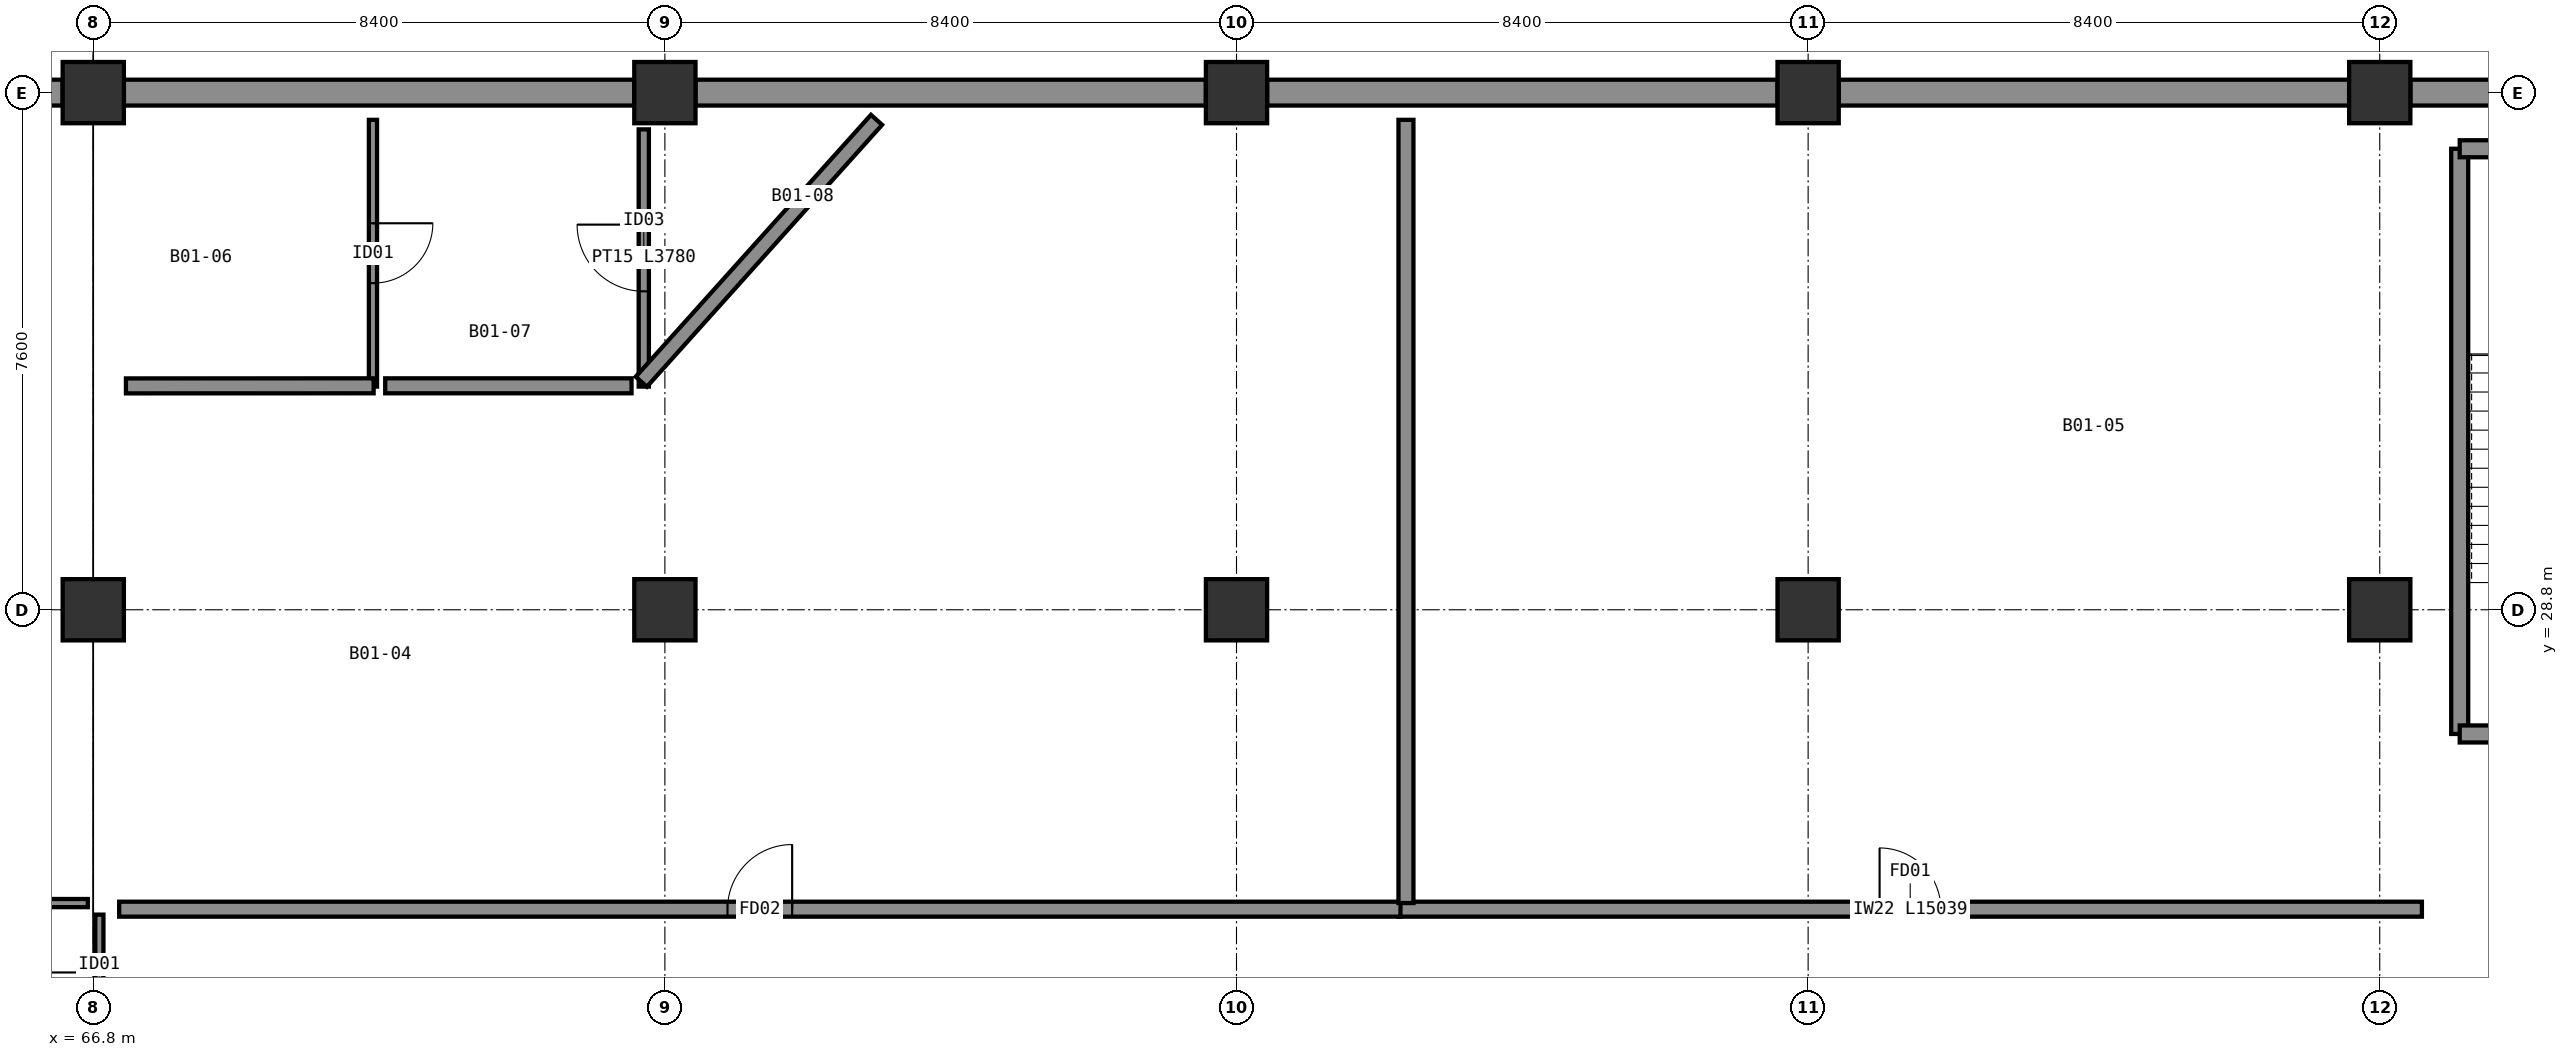
"""IFC4 building model, lengths in metres.
Left out: names, types, materials, properties, quantities, classifications, styles, units other than length and angle.
Written with IfcOpenShell. Run it as: python <this file> out.ifc"""

import sys

from ifc_helpers import new_model, si_unit, direction, frame, frame_2d, origin, origin_2d, place, context, subcontext, project, spatial, rectangle, extrude, element, fill, save


model = new_model("IFC4")
c1 = context("Model", 3, precision=1e-05, world=origin(), true_north=direction((0.0, 1.0)))
c2 = subcontext(c1, "Body", "Model", "MODEL_VIEW")
j1 = project(units=[si_unit("LENGTHUNIT", "METRE"), si_unit("PLANEANGLEUNIT", "RADIAN")], contexts=[c1])
p1 = place(None, origin())
s1 = spatial("IfcSite", under=j1, at=p1, CompositionType="ELEMENT")
p2 = place(p1, origin())
s2 = spatial("IfcBuilding", under=s1, at=p2, CompositionType="ELEMENT")
p3 = place(p2, frame((0.0, 0.0, -4.5)))
s3 = spatial("IfcBuildingStorey", under=s2, at=p3, CompositionType="ELEMENT", Elevation=-4.5)
for number, where, z_axis, x_axis in (
    (1, (66.8, 28.8, -0.4), (0.0, 0.0, 1.0), (1.0, 0.0, 0.0)),
    (2, (75.2, 28.8, -0.4), (0.0, 0.0, 1.0), (1.0, 0.0, 0.0)),
    (3, (83.6, 28.8, -0.4), (0.0, 0.0, 1.0), (1.0, 0.0, 0.0)),
    (4, (92.0, 28.8, -0.4), (0.0, 0.0, 1.0), (1.0, 0.0, 0.0)),
    (5, (100.4, 28.8, -0.4), (0.0, 0.0, 1.0), (1.0, 0.0, 0.0)),
    (6, (66.8, 36.4, -0.4), (0.0, 0.0, 1.0), (1.0, 0.0, 0.0)),
    (7, (75.2, 36.4, -0.4), (0.0, 0.0, 1.0), (1.0, 0.0, 0.0)),
    (8, (83.6, 36.4, -0.4), (0.0, 0.0, 1.0), (1.0, 0.0, 0.0)),
    (9, (92.0, 36.4, -0.4), (0.0, 0.0, 1.0), (1.0, 0.0, 0.0)),
    (10, (100.4, 36.4, -0.4), (0.0, 0.0, 1.0), (1.0, 0.0, 0.0)),
):
    element("IfcColumn", number, at=place(p3, frame(where, z_axis=z_axis, x_axis=x_axis)), inside=s3, PredefinedType="COLUMN", context=c2, shape_type="SweptSolid", body=[
        extrude(rectangle(XDim=0.9, YDim=0.9, at=origin_2d()), origin(), (0.0, 0.0, 1.0), 4.9),
    ])
for number, where, z_axis, x_axis in (
    (11, (108.35, 36.4, 0.0), (0.0, 0.0, 1.0), (-1.0, 0.0, 0.0)),
    (12, (99.95, 36.4, 0.0), (0.0, 0.0, 1.0), (-1.0, 0.0, 0.0)),
    (13, (91.55, 36.4, 0.0), (0.0, 0.0, 1.0), (-1.0, 0.0, 0.0)),
    (14, (83.15, 36.4, 0.0), (0.0, 0.0, 1.0), (-1.0, 0.0, 0.0)),
    (15, (74.75, 36.4, 0.0), (0.0, 0.0, 1.0), (-1.0, 0.0, 0.0)),
):
    element("IfcWall", number, at=place(p3, frame(where, z_axis=z_axis, x_axis=x_axis)), inside=s3, PredefinedType="SOLIDWALL", context=c2, shape_type="SweptSolid", body=[
        extrude(rectangle(XDim=7.5, YDim=0.38, at=frame_2d((3.75, 0.0))), origin(), (0.0, 0.0, 1.0), 3.51),
    ])
p4 = place(p3, frame((66.35, 36.4, 0.0), z_axis=(0.0, 0.0, 1.0), x_axis=(-1.0, 0.0, 0.0)))
e16 = element("IfcWall", 16, at=p4, inside=s3, PredefinedType="SOLIDWALL", context=c2, shape_type="SweptSolid", body=[
    extrude(rectangle(XDim=7.575, YDim=0.38, at=frame_2d((3.788, 0.0))), origin(), (0.0, 0.0, 1.0), 3.51),
])
p5 = place(p3, frame((101.575, 26.975, 0.0), z_axis=(0.0, 0.0, 1.0), x_axis=(0.0, 1.0, 0.0)))
e17 = element("IfcWall", 17, at=p5, inside=s3, PredefinedType="SHEAR", context=c2, shape_type="SweptSolid", body=[
    extrude(rectangle(XDim=8.6, YDim=0.25, at=frame_2d((4.3, 0.0))), origin(), (0.0, 0.0, 1.0), 4.18),
])
p6 = place(p3, frame((101.575, 35.575, 0.0), z_axis=(0.0, 0.0, 1.0), x_axis=(1.0, 0.0, 0.0)))
e18 = element("IfcWall", 18, at=p6, inside=s3, PredefinedType="SHEAR", context=c2, shape_type="SweptSolid", body=[
    extrude(rectangle(XDim=4.45, YDim=0.25, at=frame_2d((2.225, 0.0))), origin(), (0.0, 0.0, 1.0), 4.18),
])
p7 = place(p3, frame((101.575, 26.975, 0.0), z_axis=(0.0, 0.0, 1.0), x_axis=(1.0, 0.0, 0.0)))
e19 = element("IfcWall", 19, at=p7, inside=s3, PredefinedType="SHEAR", context=c2, shape_type="SweptSolid", body=[
    extrude(rectangle(XDim=4.45, YDim=0.25, at=frame_2d((2.225, 0.0))), origin(), (0.0, 0.0, 1.0), 4.18),
])
p8 = place(p7, frame((1.65, 0.0, 0.0)))
e20 = element("IfcOpeningElement", 20, at=p8, cuts=e19, PredefinedType="OPENING", context=c2, shape_type="SweptSolid", body=[
    extrude(rectangle(XDim=1.1, YDim=2.1, at=frame_2d((0.55, 1.05))), frame((0.0, 0.135, 0.0), z_axis=(0.0, -1.0, 0.0), x_axis=(1.0, 0.0, 0.0)), (0.0, 0.0, 1.0), 0.27),
])
p9 = place(p3, frame((85.98, 24.4, 0.0), z_axis=(0.0, 0.0, 1.0), x_axis=(1.0, 0.0, 0.0)))
e21 = element("IfcWall", 21, at=p9, inside=s3, PredefinedType="SOLIDWALL", context=c2, shape_type="SweptSolid", body=[
    extrude(rectangle(XDim=15.039, YDim=0.22, at=frame_2d((7.52, 0.0))), origin(), (0.0, 0.0, 1.0), 4.16),
])
p10 = place(p9, frame((7.07, 0.0, 0.0)))
e22 = element("IfcOpeningElement", 22, at=p10, cuts=e21, PredefinedType="OPENING", context=c2, shape_type="SweptSolid", body=[
    extrude(rectangle(XDim=0.9, YDim=2.1, at=frame_2d((0.45, 1.05))), frame((0.0, 0.12, 0.0), z_axis=(0.0, -1.0, 0.0), x_axis=(1.0, 0.0, 0.0)), (0.0, 0.0, 1.0), 0.24),
])
p11 = place(p3, frame((67.18, 24.4, 0.0), z_axis=(0.0, 0.0, 1.0), x_axis=(1.0, 0.0, 0.0)))
e23 = element("IfcWall", 23, at=p11, inside=s3, PredefinedType="SOLIDWALL", context=c2, shape_type="SweptSolid", body=[
    extrude(rectangle(XDim=18.829, YDim=0.22, at=frame_2d((9.415, 0.0))), origin(), (0.0, 0.0, 1.0), 4.16),
])
p12 = place(p11, frame((8.939, 0.0, 0.0)))
e24 = element("IfcOpeningElement", 24, at=p12, cuts=e23, PredefinedType="OPENING", context=c2, shape_type="SweptSolid", body=[
    extrude(rectangle(XDim=0.95, YDim=2.1, at=frame_2d((0.475, 1.05))), frame((0.0, 0.12, 0.0), z_axis=(0.0, -1.0, 0.0), x_axis=(1.0, 0.0, 0.0)), (0.0, 0.0, 1.0), 0.24),
])
p13 = place(p3, frame((66.89, 21.74, 0.0), z_axis=(0.0, 0.0, 1.0), x_axis=(-0.000189250564, 0.999999982092, 0.0)))
e25 = element("IfcWall", 25, at=p13, inside=s3, PredefinedType="PARTITIONING", context=c2, shape_type="SweptSolid", body=[
    extrude(rectangle(XDim=2.58, YDim=0.12, at=frame_2d((1.29, 0.0))), origin(), (0.0, 0.0, 1.0), 3.51),
])
p14 = place(p13, frame((0.85, 0.0, 0.0)))
e26 = element("IfcOpeningElement", 26, at=p14, cuts=e25, PredefinedType="OPENING", context=c2, shape_type="SweptSolid", body=[
    extrude(rectangle(XDim=0.88, YDim=2.08, at=frame_2d((0.44, 1.04))), frame((0.0, 0.07, 0.0), z_axis=(0.0, -1.0, 0.0), x_axis=(1.0, 0.0, 0.0)), (0.0, 0.0, 1.0), 0.14),
])
p15 = place(p3, frame((66.72, 24.49, 0.0), z_axis=(0.0, 0.0, 1.0), x_axis=(-0.999999823344, 0.000594400927, 0.0)))
e27 = element("IfcWall", 27, at=p15, inside=s3, PredefinedType="PARTITIONING", context=c2, shape_type="SweptSolid", body=[
    extrude(rectangle(XDim=16.84, YDim=0.12, at=frame_2d((8.42, 0.0))), origin(), (0.0, 0.0, 1.0), 4.16),
])
p16 = place(p15, frame((7.96, 0.0, 0.0)))
e28 = element("IfcOpeningElement", 28, at=p16, cuts=e27, PredefinedType="OPENING", context=c2, shape_type="SweptSolid", body=[
    extrude(rectangle(XDim=0.92, YDim=2.08, at=frame_2d((0.46, 1.04))), frame((0.0, 0.07, 0.0), z_axis=(0.0, -1.0, 0.0), x_axis=(1.0, 0.0, 0.0)), (0.0, 0.0, 1.0), 0.14),
])
p17 = place(p3, frame((74.89, 32.08, 0.0), z_axis=(0.0, 0.0, 1.0), x_axis=(0.0, 1.0, 0.0)))
e29 = element("IfcWall", 29, at=p17, inside=s3, PredefinedType="PARTITIONING", context=c2, shape_type="SweptSolid", body=[
    extrude(rectangle(XDim=3.78, YDim=0.15, at=frame_2d((1.89, 0.0))), origin(), (0.0, 0.0, 1.0), 4.16),
])
p18 = place(p17, frame((1.4, 0.0, 0.0)))
e30 = element("IfcOpeningElement", 30, at=p18, cuts=e29, PredefinedType="OPENING", context=c2, shape_type="SweptSolid", body=[
    extrude(rectangle(XDim=0.98, YDim=2.08, at=frame_2d((0.49, 1.04))), frame((0.0, 0.085, 0.0), z_axis=(0.0, -1.0, 0.0), x_axis=(1.0, 0.0, 0.0)), (0.0, 0.0, 1.0), 0.17),
])
p19 = place(p3, frame((78.31, 36.0, 0.0), z_axis=(0.0, 0.0, 1.0), x_axis=(-0.668145634305, -0.744030517761, 0.0)))
e31 = element("IfcWall", 31, at=p19, inside=s3, PredefinedType="SOLIDWALL", context=c2, shape_type="SweptSolid", body=[
    extrude(rectangle(XDim=5.173, YDim=0.22, at=frame_2d((2.587, 0.0))), origin(), (0.0, 0.0, 1.0), 4.16),
])
p20 = place(p3, frame((70.91, 36.0, 0.0), z_axis=(0.0, 0.0, 1.0), x_axis=(0.0, -1.0, 0.0)))
e32 = element("IfcWall", 32, at=p20, inside=s3, PredefinedType="PARTITIONING", context=c2, shape_type="SweptSolid", body=[
    extrude(rectangle(XDim=3.92, YDim=0.12, at=frame_2d((1.96, 0.0))), origin(), (0.0, 0.0, 1.0), 4.16),
])
p21 = place(p20, frame((1.52, 0.0, 0.0)))
e33 = element("IfcOpeningElement", 33, at=p21, cuts=e32, PredefinedType="OPENING", context=c2, shape_type="SweptSolid", body=[
    extrude(rectangle(XDim=0.88, YDim=2.08, at=frame_2d((0.44, 1.04))), frame((0.0, 0.07, 0.0), z_axis=(0.0, -1.0, 0.0), x_axis=(1.0, 0.0, 0.0)), (0.0, 0.0, 1.0), 0.14),
])
p22 = place(p3, frame((70.92, 32.091, 0.0), z_axis=(0.0, 0.0, 1.0), x_axis=(-0.999999943764, -0.00033536788, 0.0)))
e34 = element("IfcWall", 34, at=p22, inside=s3, PredefinedType="SOLIDWALL", context=c2, shape_type="SweptSolid", body=[
    extrude(rectangle(XDim=3.64, YDim=0.22, at=frame_2d((1.82, 0.0))), origin(), (0.0, 0.0, 1.0), 4.16),
])
p23 = place(p3, frame((74.71, 32.091, 0.0), z_axis=(0.0, 0.0, 1.0), x_axis=(-1.0, 0.0, 0.0)))
e35 = element("IfcWall", 35, at=p23, inside=s3, PredefinedType="SOLIDWALL", context=c2, shape_type="SweptSolid", body=[
    extrude(rectangle(XDim=3.62, YDim=0.22, at=frame_2d((1.81, 0.0))), origin(), (0.0, 0.0, 1.0), 4.16),
])
p24 = place(p3, frame((86.09, 24.49, 0.0), z_axis=(0.0, 0.0, 1.0), x_axis=(0.0, 1.0, 0.0)))
e36 = element("IfcWall", 36, at=p24, inside=s3, PredefinedType="SOLIDWALL", context=c2, shape_type="SweptSolid", body=[
    extrude(rectangle(XDim=11.51, YDim=0.22, at=frame_2d((5.755, 0.0))), origin(), (0.0, 0.0, 1.0), 4.16),
])
p25 = place(p10, origin())
e37 = element("IfcDoor", 37, at=p25, inside=s3, OperationType="SINGLE_SWING_LEFT", PredefinedType="DOOR", context=c2, shape_type="SweptSolid", body=[
    extrude(rectangle(XDim=0.9, YDim=2.1, at=frame_2d((0.45, 1.05))), frame((0.0, 0.025, 0.0), z_axis=(0.0, -1.0, 0.0), x_axis=(1.0, 0.0, 0.0)), (0.0, 0.0, 1.0), 0.05),
])
fill(e22, e37)
p26 = place(p12, origin())
e38 = element("IfcDoor", 38, at=p26, inside=s3, OperationType="SINGLE_SWING_RIGHT", PredefinedType="DOOR", context=c2, shape_type="SweptSolid", body=[
    extrude(rectangle(XDim=0.95, YDim=2.1, at=frame_2d((0.475, 1.05))), frame((0.0, 0.025, 0.0), z_axis=(0.0, -1.0, 0.0), x_axis=(1.0, 0.0, 0.0)), (0.0, 0.0, 1.0), 0.05),
])
fill(e24, e38)
p27 = place(p14, origin())
e39 = element("IfcDoor", 39, at=p27, inside=s3, OperationType="SINGLE_SWING_RIGHT", PredefinedType="DOOR", context=c2, shape_type="SweptSolid", body=[
    extrude(rectangle(XDim=0.88, YDim=2.08, at=frame_2d((0.44, 1.04))), frame((0.0, 0.025, 0.0), z_axis=(0.0, -1.0, 0.0), x_axis=(1.0, 0.0, 0.0)), (0.0, 0.0, 1.0), 0.05),
])
fill(e26, e39)
p28 = place(p18, origin())
e40 = element("IfcDoor", 40, at=p28, inside=s3, OperationType="SINGLE_SWING_RIGHT", PredefinedType="DOOR", context=c2, shape_type="SweptSolid", body=[
    extrude(rectangle(XDim=0.98, YDim=2.08, at=frame_2d((0.49, 1.04))), frame((0.0, 0.025, 0.0), z_axis=(0.0, -1.0, 0.0), x_axis=(1.0, 0.0, 0.0)), (0.0, 0.0, 1.0), 0.05),
])
fill(e30, e40)
p29 = place(p21, origin())
e41 = element("IfcDoor", 41, at=p29, inside=s3, OperationType="SINGLE_SWING_LEFT", PredefinedType="DOOR", context=c2, shape_type="SweptSolid", body=[
    extrude(rectangle(XDim=0.88, YDim=2.08, at=frame_2d((0.44, 1.04))), frame((0.0, 0.025, 0.0), z_axis=(0.0, -1.0, 0.0), x_axis=(1.0, 0.0, 0.0)), (0.0, 0.0, 1.0), 0.05),
])
fill(e33, e41)
save(model, sys.argv[1])
